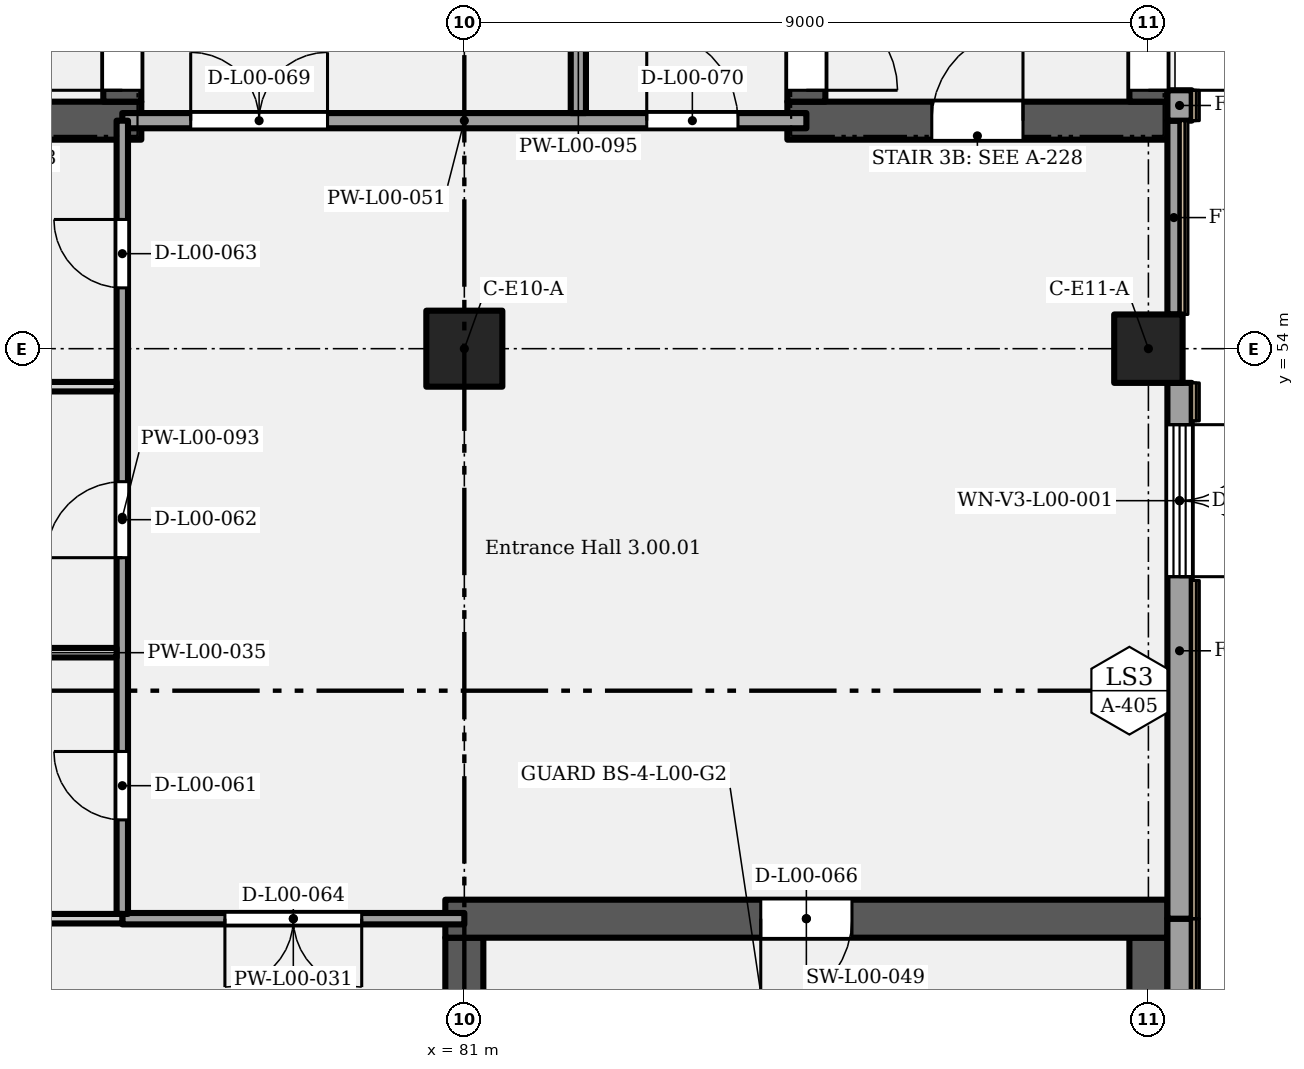
"""IFC4 building model, lengths in metres.
Left out: names, types, materials, properties, quantities, classifications, styles, units other than length and angle.
Written with IfcOpenShell. Run it as: python <this file> out.ifc"""

import sys

from ifc_helpers import new_model, si_unit, direction, frame, frame_2d, origin, origin_2d, place, context, subcontext, project, spatial, rectangle, extrude, element, fill, save


model = new_model("IFC4")
c1 = context("Model", 3, precision=1e-05, world=origin(), true_north=direction((0.0, 1.0)))
c2 = subcontext(c1, "Body", "Model", "MODEL_VIEW")
j1 = project(units=[si_unit("LENGTHUNIT", "METRE"), si_unit("PLANEANGLEUNIT", "RADIAN")], contexts=[c1])
p1 = place(None, origin())
s1 = spatial("IfcSite", under=j1, at=p1, CompositionType="ELEMENT")
p2 = place(p1, origin())
s2 = spatial("IfcBuilding", under=s1, at=p2, CompositionType="ELEMENT")
p3 = place(p2, origin())
s3 = spatial("IfcBuildingStorey", under=s2, at=p3, CompositionType="ELEMENT", Elevation=0.0)
p4 = place(p3, frame((81.0, 54.0, 0.0), z_axis=(0.0, 0.0, 1.0), x_axis=(1.0, 0.0, 0.0)))
e1 = element("IfcColumn", 1, at=p4, inside=s3, PredefinedType="COLUMN", context=c2, shape_type="SweptSolid", body=[
    extrude(rectangle(XDim=1.0, YDim=1.0, at=origin_2d()), origin(), (0.0, 0.0, 1.0), 6.6),
])
p5 = place(p3, frame((90.0, 54.0, 0.0), z_axis=(0.0, 0.0, 1.0), x_axis=(1.0, 0.0, 0.0)))
e2 = element("IfcColumn", 2, at=p5, inside=s3, PredefinedType="COLUMN", context=c2, shape_type="SweptSolid", body=[
    extrude(rectangle(XDim=0.9, YDim=0.9, at=origin_2d()), origin(), (0.0, 0.0, 1.0), 6.6),
])
p6 = place(p3, frame((90.0, 37.95, 0.0), z_axis=(0.0, 0.0, 1.0), x_axis=(0.0, 1.0, 0.0)))
e3 = element("IfcWall", 3, at=p6, inside=s3, PredefinedType="SHEAR", context=c2, shape_type="SweptSolid", body=[
    extrude(rectangle(XDim=8.3, YDim=0.5, at=frame_2d((4.15, 0.0))), origin(), (0.0, 0.0, 1.0), 6.3),
])
p7 = place(p6, frame((1.42, 0.0, 0.0), z_axis=(0.0, 0.0, 1.0), x_axis=(-1.0, 0.0, 0.0)))
e4 = element("IfcOpeningElement", 4, at=p7, cuts=e3, PredefinedType="OPENING", context=c2, shape_type="SweptSolid", body=[
    extrude(rectangle(XDim=1.4, YDim=2.1, at=frame_2d((0.7, 1.05))), frame((0.0, 0.26, 0.0), z_axis=(0.0, -1.0, 0.0), x_axis=(1.0, 0.0, 0.0)), (0.0, 0.0, 1.0), 0.52),
])
p8 = place(p3, frame((81.0, 38.0, 0.0), z_axis=(0.0, 0.0, 1.0), x_axis=(0.0, 1.0, 0.0)))
e5 = element("IfcWall", 5, at=p8, inside=s3, PredefinedType="SHEAR", context=c2, shape_type="SweptSolid", body=[
    extrude(rectangle(XDim=8.25, YDim=0.5, at=frame_2d((4.125, 0.0))), origin(), (0.0, 0.0, 1.0), 6.3),
])
p9 = place(p3, frame((80.75, 46.5, 0.0), z_axis=(0.0, 0.0, 1.0), x_axis=(1.0, 0.0, 0.0)))
e6 = element("IfcWall", 6, at=p9, inside=s3, PredefinedType="SHEAR", context=c2, shape_type="SweptSolid", body=[
    extrude(rectangle(XDim=9.5, YDim=0.5, at=frame_2d((4.75, 0.0))), origin(), (0.0, 0.0, 1.0), 6.3),
])
p10 = place(p9, frame((5.35, 0.0, 0.0), z_axis=(0.0, 0.0, 1.0), x_axis=(-1.0, 0.0, 0.0)))
e7 = element("IfcOpeningElement", 7, at=p10, cuts=e6, PredefinedType="OPENING", context=c2, shape_type="SweptSolid", body=[
    extrude(rectangle(XDim=1.2, YDim=2.1, at=frame_2d((0.6, 1.05))), frame((0.0, 0.26, 0.0), z_axis=(0.0, -1.0, 0.0), x_axis=(1.0, 0.0, 0.0)), (0.0, 0.0, 1.0), 0.52),
])
p11 = place(p3, frame((71.75, 57.0, 0.0), z_axis=(0.0, 0.0, 1.0), x_axis=(1.0, 0.0, 0.0)))
e8 = element("IfcWall", 8, at=p11, inside=s3, PredefinedType="SHEAR", context=c2, shape_type="SweptSolid", body=[
    extrude(rectangle(XDim=5.0, YDim=0.5, at=frame_2d((2.5, 0.0))), origin(), (0.0, 0.0, 1.0), 6.3),
])
p12 = place(p3, frame((85.25, 57.0, 0.0), z_axis=(0.0, 0.0, 1.0), x_axis=(1.0, 0.0, 0.0)))
e9 = element("IfcWall", 9, at=p12, inside=s3, PredefinedType="SHEAR", context=c2, shape_type="SweptSolid", body=[
    extrude(rectangle(XDim=5.0, YDim=0.5, at=frame_2d((2.5, 0.0))), origin(), (0.0, 0.0, 1.0), 6.3),
])
p13 = place(p12, frame((1.9, 0.0, 0.0)))
e10 = element("IfcOpeningElement", 10, at=p13, cuts=e9, PredefinedType="OPENING", context=c2, shape_type="SweptSolid", body=[
    extrude(rectangle(XDim=1.2, YDim=2.1, at=frame_2d((0.6, 1.05))), frame((0.0, 0.26, 0.0), z_axis=(0.0, -1.0, 0.0), x_axis=(1.0, 0.0, 0.0)), (0.0, 0.0, 1.0), 0.52),
])
p14 = place(p3, frame((76.5, 57.25, 0.0), z_axis=(0.0, 0.0, 1.0), x_axis=(0.0, 1.0, 0.0)))
e11 = element("IfcWall", 11, at=p14, inside=s3, PredefinedType="SHEAR", context=c2, shape_type="SweptSolid", body=[
    extrude(rectangle(XDim=8.5, YDim=0.5, at=frame_2d((4.25, 0.0))), origin(), (0.0, 0.0, 1.0), 6.3),
])
p15 = place(p14, frame((0.15, 0.0, 0.0)))
e12 = element("IfcOpeningElement", 12, at=p15, cuts=e11, PredefinedType="OPENING", context=c2, shape_type="SweptSolid", body=[
    extrude(rectangle(XDim=1.2, YDim=2.1, at=frame_2d((0.6, 1.05))), frame((0.0, 0.26, 0.0), z_axis=(0.0, -1.0, 0.0), x_axis=(1.0, 0.0, 0.0)), (0.0, 0.0, 1.0), 0.52),
])
p16 = place(p3, frame((85.5, 57.25, 0.0), z_axis=(0.0, 0.0, 1.0), x_axis=(0.0, 1.0, 0.0)))
e13 = element("IfcWall", 13, at=p16, inside=s3, PredefinedType="SHEAR", context=c2, shape_type="SweptSolid", body=[
    extrude(rectangle(XDim=8.5, YDim=0.5, at=frame_2d((4.25, 0.0))), origin(), (0.0, 0.0, 1.0), 6.3),
])
p17 = place(p16, frame((1.35, 0.0, 0.0), z_axis=(0.0, 0.0, 1.0), x_axis=(-1.0, 0.0, 0.0)))
e14 = element("IfcOpeningElement", 14, at=p17, cuts=e13, PredefinedType="OPENING", context=c2, shape_type="SweptSolid", body=[
    extrude(rectangle(XDim=1.2, YDim=2.1, at=frame_2d((0.6, 1.05))), frame((0.0, 0.26, 0.0), z_axis=(0.0, -1.0, 0.0), x_axis=(1.0, 0.0, 0.0)), (0.0, 0.0, 1.0), 0.52),
])
p18 = place(p3, frame((90.0, 57.25, 0.0), z_axis=(0.0, 0.0, 1.0), x_axis=(0.0, 1.0, 0.0)))
e15 = element("IfcWall", 15, at=p18, inside=s3, PredefinedType="SHEAR", context=c2, shape_type="SweptSolid", body=[
    extrude(rectangle(XDim=8.3, YDim=0.5, at=frame_2d((4.15, 0.0))), origin(), (0.0, 0.0, 1.0), 6.3),
])
p19 = place(p18, frame((1.35, 0.0, 0.0), z_axis=(0.0, 0.0, 1.0), x_axis=(-1.0, 0.0, 0.0)))
e16 = element("IfcOpeningElement", 16, at=p19, cuts=e15, PredefinedType="OPENING", context=c2, shape_type="SweptSolid", body=[
    extrude(rectangle(XDim=1.2, YDim=2.1, at=frame_2d((0.6, 1.05))), frame((0.0, 0.26, 0.0), z_axis=(0.0, -1.0, 0.0), x_axis=(1.0, 0.0, 0.0)), (0.0, 0.0, 1.0), 0.52),
])
p20 = place(p3, frame((90.41, 39.37, 0.0), z_axis=(0.0, 0.0, 1.0), x_axis=(0.0, 1.0, 0.0)))
e17 = element("IfcWall", 17, at=p20, inside=s3, PredefinedType="SOLIDWALL", context=c2, shape_type="SweptSolid", body=[
    extrude(rectangle(XDim=7.13, YDim=0.32, at=frame_2d((3.565, 0.0))), origin(), (0.0, 0.0, 1.0), 6.3),
])
p21 = place(p3, frame((90.41, 46.5, 0.0), z_axis=(0.0, 0.0, 1.0), x_axis=(0.0, 1.0, 0.0)))
e18 = element("IfcWall", 18, at=p21, inside=s3, PredefinedType="SOLIDWALL", context=c2, shape_type="SweptSolid", body=[
    extrude(rectangle(XDim=7.05, YDim=0.32, at=frame_2d((3.525, 0.0))), origin(), (0.0, 0.0, 1.0), 6.3),
])
p22 = place(p21, frame((6.5, 0.0, 0.0), z_axis=(0.0, 0.0, 1.0), x_axis=(-1.0, 0.0, 0.0)))
e19 = element("IfcOpeningElement", 19, at=p22, cuts=e18, PredefinedType="OPENING", context=c2, shape_type="SweptSolid", body=[
    extrude(rectangle(XDim=2.0, YDim=2.1, at=frame_2d((1.0, 1.05))), frame((0.0, 0.17, 0.0), z_axis=(0.0, -1.0, 0.0), x_axis=(1.0, 0.0, 0.0)), (0.0, 0.0, 1.0), 0.34),
])
p23 = place(p21, frame((4.5, 0.0, 2.25)))
e20 = element("IfcOpeningElement", 20, at=p23, cuts=e18, PredefinedType="OPENING", context=c2, shape_type="SweptSolid", body=[
    extrude(rectangle(XDim=2.0, YDim=0.8, at=frame_2d((1.0, 0.4))), frame((0.0, 0.17, 0.0), z_axis=(0.0, -1.0, 0.0), x_axis=(1.0, 0.0, 0.0)), (0.0, 0.0, 1.0), 0.34),
])
p24 = place(p3, frame((90.335, 54.45, 0.0), z_axis=(0.0, 0.0, 1.0), x_axis=(0.0, 1.0, 0.0)))
e21 = element("IfcWall", 21, at=p24, inside=s3, PredefinedType="SOLIDWALL", context=c2, shape_type="SweptSolid", body=[
    extrude(rectangle(XDim=2.55, YDim=0.17, at=frame_2d((1.275, 0.0))), origin(), (0.0, 0.0, 1.0), 6.3),
])
p25 = place(p3, frame((90.41, 57.0, 0.0), z_axis=(0.0, 0.0, 1.0), x_axis=(0.0, 1.0, 0.0)))
e22 = element("IfcWall", 22, at=p25, inside=s3, PredefinedType="SOLIDWALL", context=c2, shape_type="SweptSolid", body=[
    extrude(rectangle(XDim=0.4, YDim=0.32, at=frame_2d((0.2, 0.0))), origin(), (0.0, 0.0, 1.0), 6.3),
])
p26 = place(p3, frame((72.0, 46.5, 0.0), z_axis=(0.0, 0.0, 1.0), x_axis=(1.0, 0.0, 0.0)))
e23 = element("IfcWall", 23, at=p26, inside=s3, PredefinedType="PARTITIONING", context=c2, shape_type="SweptSolid", body=[
    extrude(rectangle(XDim=4.5, YDim=0.125, at=frame_2d((2.25, 0.0))), origin(), (0.0, 0.0, 1.0), 6.3),
])
p27 = place(p3, frame((76.5, 46.5, 0.0), z_axis=(0.0, 0.0, 1.0), x_axis=(1.0, 0.0, 0.0)))
e24 = element("IfcWall", 24, at=p27, inside=s3, PredefinedType="PARTITIONING", context=c2, shape_type="SweptSolid", body=[
    extrude(rectangle(XDim=4.5, YDim=0.15, at=frame_2d((2.25, 0.0))), origin(), (0.0, 0.0, 1.0), 6.3),
])
p28 = place(p27, frame((3.15, 0.0, 0.0), z_axis=(0.0, 0.0, 1.0), x_axis=(-1.0, 0.0, 0.0)))
e25 = element("IfcOpeningElement", 25, at=p28, cuts=e24, PredefinedType="OPENING", context=c2, shape_type="SweptSolid", body=[
    extrude(rectangle(XDim=1.8, YDim=2.4, at=frame_2d((0.9, 1.2))), frame((0.0, 0.085, 0.0), z_axis=(0.0, -1.0, 0.0), x_axis=(1.0, 0.0, 0.0)), (0.0, 0.0, 1.0), 0.17),
])
for number, where, z_axis, x_axis in (
    (26, (72.0, 50.0, 0.0), (0.0, 0.0, 1.0), (1.0, 0.0, 0.0)),
    (27, (72.0, 53.5, 0.0), (0.0, 0.0, 1.0), (1.0, 0.0, 0.0)),
):
    element("IfcWall", number, at=place(p3, frame(where, z_axis=z_axis, x_axis=x_axis)), inside=s3, PredefinedType="PARTITIONING", context=c2, shape_type="SweptSolid", body=[
        extrude(rectangle(XDim=4.425, YDim=0.125, at=frame_2d((2.212, 0.0))), origin(), (0.0, 0.0, 1.0), 6.3),
    ])
p29 = place(p3, frame((76.5, 57.0, 0.0), z_axis=(0.0, 0.0, 1.0), x_axis=(1.0, 0.0, 0.0)))
e28 = element("IfcWall", 28, at=p29, inside=s3, PredefinedType="PARTITIONING", context=c2, shape_type="SweptSolid", body=[
    extrude(rectangle(XDim=9.0, YDim=0.2, at=frame_2d((4.5, 0.0))), origin(), (0.0, 0.0, 1.0), 6.3),
])
p30 = place(p29, frame((0.9, 0.0, 0.0)))
e29 = element("IfcOpeningElement", 29, at=p30, cuts=e28, PredefinedType="OPENING", context=c2, shape_type="SweptSolid", body=[
    extrude(rectangle(XDim=1.8, YDim=2.1, at=frame_2d((0.9, 1.05))), frame((0.0, 0.11, 0.0), z_axis=(0.0, -1.0, 0.0), x_axis=(1.0, 0.0, 0.0)), (0.0, 0.0, 1.0), 0.22),
])
p31 = place(p29, frame((6.9, 0.0, 0.0)))
e30 = element("IfcOpeningElement", 30, at=p31, cuts=e28, PredefinedType="OPENING", context=c2, shape_type="SweptSolid", body=[
    extrude(rectangle(XDim=1.2, YDim=2.1, at=frame_2d((0.6, 1.05))), frame((0.0, 0.11, 0.0), z_axis=(0.0, -1.0, 0.0), x_axis=(1.0, 0.0, 0.0)), (0.0, 0.0, 1.0), 0.22),
])
p32 = place(p3, frame((76.5, 46.562, 0.0), z_axis=(0.0, 0.0, 1.0), x_axis=(0.0, 1.0, 0.0)))
e31 = element("IfcWall", 31, at=p32, inside=s3, PredefinedType="PARTITIONING", context=c2, shape_type="SweptSolid", body=[
    extrude(rectangle(XDim=10.438, YDim=0.15, at=frame_2d((5.219, 0.0))), origin(), (0.0, 0.0, 1.0), 6.3),
])
p33 = place(p32, frame((1.238, 0.0, 0.0)))
e32 = element("IfcOpeningElement", 32, at=p33, cuts=e31, PredefinedType="OPENING", context=c2, shape_type="SweptSolid", body=[
    extrude(rectangle(XDim=0.9, YDim=2.1, at=frame_2d((0.45, 1.05))), frame((0.0, 0.085, 0.0), z_axis=(0.0, -1.0, 0.0), x_axis=(1.0, 0.0, 0.0)), (0.0, 0.0, 1.0), 0.17),
])
p34 = place(p32, frame((4.688, 0.0, 0.0)))
e33 = element("IfcOpeningElement", 33, at=p34, cuts=e31, PredefinedType="OPENING", context=c2, shape_type="SweptSolid", body=[
    extrude(rectangle(XDim=1.0, YDim=2.1, at=frame_2d((0.5, 1.05))), frame((0.0, 0.085, 0.0), z_axis=(0.0, -1.0, 0.0), x_axis=(1.0, 0.0, 0.0)), (0.0, 0.0, 1.0), 0.17),
])
p35 = place(p32, frame((8.238, 0.0, 0.0)))
e34 = element("IfcOpeningElement", 34, at=p35, cuts=e31, PredefinedType="OPENING", context=c2, shape_type="SweptSolid", body=[
    extrude(rectangle(XDim=0.9, YDim=2.1, at=frame_2d((0.45, 1.05))), frame((0.0, 0.085, 0.0), z_axis=(0.0, -1.0, 0.0), x_axis=(1.0, 0.0, 0.0)), (0.0, 0.0, 1.0), 0.17),
])
p36 = place(p3, frame((82.5, 57.1, 0.0), z_axis=(0.0, 0.0, 1.0), x_axis=(0.0, 1.0, 0.0)))
e35 = element("IfcWall", 35, at=p36, inside=s3, PredefinedType="PARTITIONING", context=c2, shape_type="SweptSolid", body=[
    extrude(rectangle(XDim=2.9, YDim=0.2, at=frame_2d((1.45, 0.0))), origin(), (0.0, 0.0, 1.0), 6.3),
])
p37 = place(p36, frame((2.2, 0.0, 0.0), z_axis=(0.0, 0.0, 1.0), x_axis=(-1.0, 0.0, 0.0)))
e36 = element("IfcOpeningElement", 36, at=p37, cuts=e35, PredefinedType="OPENING", context=c2, shape_type="SweptSolid", body=[
    extrude(rectangle(XDim=1.2, YDim=2.1, at=frame_2d((0.6, 1.05))), frame((0.0, 0.11, 0.0), z_axis=(0.0, -1.0, 0.0), x_axis=(1.0, 0.0, 0.0)), (0.0, 0.0, 1.0), 0.22),
])
p38 = place(p22, origin())
e37 = element("IfcDoor", 37, at=p38, inside=s3, OperationType="DOUBLE_DOOR_SINGLE_SWING", PredefinedType="DOOR", context=c2, shape_type="SweptSolid", body=[
    extrude(rectangle(XDim=2.0, YDim=2.1, at=frame_2d((1.0, 1.05))), frame((0.0, 0.025, 0.0), z_axis=(0.0, -1.0, 0.0), x_axis=(1.0, 0.0, 0.0)), (0.0, 0.0, 1.0), 0.05),
])
fill(e19, e37)
p39 = place(p23, origin())
e38 = element("IfcWindow", 38, at=p39, inside=s3, PartitioningType="SINGLE_PANEL", PredefinedType="WINDOW", context=c2, shape_type="SweptSolid", body=[
    extrude(rectangle(XDim=2.0, YDim=0.8, at=frame_2d((1.0, 0.4))), frame((0.0, 0.03, 0.0), z_axis=(0.0, -1.0, 0.0), x_axis=(1.0, 0.0, 0.0)), (0.0, 0.0, 1.0), 0.06),
])
fill(e20, e38)
p40 = place(p19, origin())
e39 = element("IfcDoor", 39, at=p40, inside=s3, OperationType="SINGLE_SWING_LEFT", PredefinedType="DOOR", context=c2, shape_type="SweptSolid", body=[
    extrude(rectangle(XDim=1.2, YDim=2.1, at=frame_2d((0.6, 1.05))), frame((0.0, 0.025, 0.0), z_axis=(0.0, -1.0, 0.0), x_axis=(1.0, 0.0, 0.0)), (0.0, 0.0, 1.0), 0.05),
])
fill(e16, e39)
p41 = place(p15, origin())
e40 = element("IfcDoor", 40, at=p41, inside=s3, OperationType="SINGLE_SWING_LEFT", PredefinedType="DOOR", context=c2, shape_type="SweptSolid", body=[
    extrude(rectangle(XDim=1.2, YDim=2.1, at=frame_2d((0.6, 1.05))), frame((0.0, 0.025, 0.0), z_axis=(0.0, -1.0, 0.0), x_axis=(1.0, 0.0, 0.0)), (0.0, 0.0, 1.0), 0.05),
])
fill(e12, e40)
p42 = place(p17, origin())
e41 = element("IfcDoor", 41, at=p42, inside=s3, OperationType="SINGLE_SWING_RIGHT", PredefinedType="DOOR", context=c2, shape_type="SweptSolid", body=[
    extrude(rectangle(XDim=1.2, YDim=2.1, at=frame_2d((0.6, 1.05))), frame((0.0, 0.025, 0.0), z_axis=(0.0, -1.0, 0.0), x_axis=(1.0, 0.0, 0.0)), (0.0, 0.0, 1.0), 0.05),
])
fill(e14, e41)
p43 = place(p33, origin())
e42 = element("IfcDoor", 42, at=p43, inside=s3, OperationType="SINGLE_SWING_RIGHT", PredefinedType="DOOR", context=c2, shape_type="SweptSolid", body=[
    extrude(rectangle(XDim=0.9, YDim=2.1, at=frame_2d((0.45, 1.05))), frame((0.0, 0.025, 0.0), z_axis=(0.0, -1.0, 0.0), x_axis=(1.0, 0.0, 0.0)), (0.0, 0.0, 1.0), 0.05),
])
fill(e32, e42)
p44 = place(p34, origin())
e43 = element("IfcDoor", 43, at=p44, inside=s3, OperationType="SINGLE_SWING_LEFT", PredefinedType="DOOR", context=c2, shape_type="SweptSolid", body=[
    extrude(rectangle(XDim=1.0, YDim=2.1, at=frame_2d((0.5, 1.05))), frame((0.0, 0.025, 0.0), z_axis=(0.0, -1.0, 0.0), x_axis=(1.0, 0.0, 0.0)), (0.0, 0.0, 1.0), 0.05),
])
fill(e33, e43)
p45 = place(p35, origin())
e44 = element("IfcDoor", 44, at=p45, inside=s3, OperationType="SINGLE_SWING_RIGHT", PredefinedType="DOOR", context=c2, shape_type="SweptSolid", body=[
    extrude(rectangle(XDim=0.9, YDim=2.1, at=frame_2d((0.45, 1.05))), frame((0.0, 0.025, 0.0), z_axis=(0.0, -1.0, 0.0), x_axis=(1.0, 0.0, 0.0)), (0.0, 0.0, 1.0), 0.05),
])
fill(e34, e44)
p46 = place(p28, origin())
e45 = element("IfcDoor", 45, at=p46, inside=s3, OperationType="DOUBLE_DOOR_SINGLE_SWING", PredefinedType="DOOR", context=c2, shape_type="SweptSolid", body=[
    extrude(rectangle(XDim=1.8, YDim=2.4, at=frame_2d((0.9, 1.2))), frame((0.0, 0.025, 0.0), z_axis=(0.0, -1.0, 0.0), x_axis=(1.0, 0.0, 0.0)), (0.0, 0.0, 1.0), 0.05),
])
fill(e25, e45)
p47 = place(p10, origin())
e46 = element("IfcDoor", 46, at=p47, inside=s3, OperationType="SINGLE_SWING_RIGHT", PredefinedType="DOOR", context=c2, shape_type="SweptSolid", body=[
    extrude(rectangle(XDim=1.2, YDim=2.1, at=frame_2d((0.6, 1.05))), frame((0.0, 0.025, 0.0), z_axis=(0.0, -1.0, 0.0), x_axis=(1.0, 0.0, 0.0)), (0.0, 0.0, 1.0), 0.05),
])
fill(e7, e46)
p48 = place(p30, origin())
e47 = element("IfcDoor", 47, at=p48, inside=s3, OperationType="DOUBLE_DOOR_SINGLE_SWING", PredefinedType="DOOR", context=c2, shape_type="SweptSolid", body=[
    extrude(rectangle(XDim=1.8, YDim=2.1, at=frame_2d((0.9, 1.05))), frame((0.0, 0.025, 0.0), z_axis=(0.0, -1.0, 0.0), x_axis=(1.0, 0.0, 0.0)), (0.0, 0.0, 1.0), 0.05),
])
fill(e29, e47)
p49 = place(p31, origin())
e48 = element("IfcDoor", 48, at=p49, inside=s3, OperationType="SINGLE_SWING_LEFT", PredefinedType="DOOR", context=c2, shape_type="SweptSolid", body=[
    extrude(rectangle(XDim=1.2, YDim=2.1, at=frame_2d((0.6, 1.05))), frame((0.0, 0.025, 0.0), z_axis=(0.0, -1.0, 0.0), x_axis=(1.0, 0.0, 0.0)), (0.0, 0.0, 1.0), 0.05),
])
fill(e30, e48)
p50 = place(p13, origin())
e49 = element("IfcDoor", 49, at=p50, inside=s3, OperationType="SINGLE_SWING_RIGHT", PredefinedType="DOOR", context=c2, shape_type="SweptSolid", body=[
    extrude(rectangle(XDim=1.2, YDim=2.1, at=frame_2d((0.6, 1.05))), frame((0.0, 0.025, 0.0), z_axis=(0.0, -1.0, 0.0), x_axis=(1.0, 0.0, 0.0)), (0.0, 0.0, 1.0), 0.05),
])
fill(e10, e49)
save(model, sys.argv[1])
